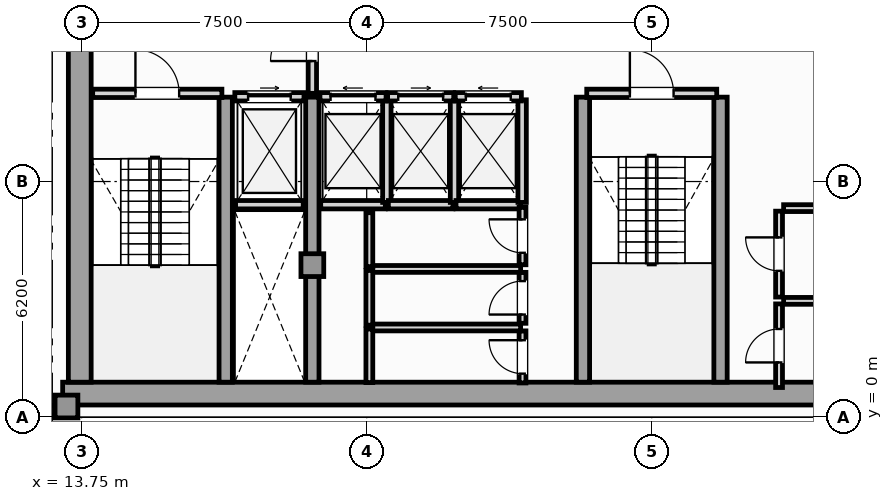
"""IFC4 building model, lengths in metres.
Left out: names, types, materials, properties, quantities, classifications, styles, units other than length and angle.
Written with IfcOpenShell. Run it as: python <this file> out.ifc"""

import sys

from ifc_helpers import new_model, si_unit, direction, frame, frame_2d, origin, origin_2d, place, context, subcontext, project, spatial, rectangle, extrude, element, fill, save


model = new_model("IFC4")
c1 = context("Model", 3, precision=1e-05, world=origin(), true_north=direction((0.0, 1.0)))
c2 = subcontext(c1, "Body", "Model", "MODEL_VIEW")
j1 = project(units=[si_unit("LENGTHUNIT", "METRE"), si_unit("PLANEANGLEUNIT", "RADIAN")], contexts=[c1])
p1 = place(None, origin())
s1 = spatial("IfcSite", under=j1, at=p1, CompositionType="ELEMENT")
p2 = place(p1, origin())
s2 = spatial("IfcBuilding", under=s1, at=p2, CompositionType="ELEMENT")
p3 = place(p2, frame((0.0, 0.0, 284.9)))
s3 = spatial("IfcBuildingStorey", under=s2, at=p3, CompositionType="ELEMENT", Elevation=284.9)
p4 = place(p3, frame((13.25, 0.62, 0.0), z_axis=(0.0, 0.0, 1.0), x_axis=(1.0, 0.0, 0.0)))
e1 = element("IfcWall", 1, at=p4, inside=s3, PredefinedType="SHEAR", context=c2, shape_type="SweptSolid", body=[
    extrude(rectangle(XDim=31.0, YDim=0.6, at=frame_2d((15.5, 0.0))), origin(), (0.0, 0.0, 1.0), 3.65),
])
p5 = place(p3, frame((13.7, 0.92, 0.0), z_axis=(0.0, 0.0, 1.0), x_axis=(0.0, 1.0, 0.0)))
e2 = element("IfcWall", 2, at=p5, inside=s3, PredefinedType="SHEAR", context=c2, shape_type="SweptSolid", body=[
    extrude(rectangle(XDim=10.53, YDim=0.6, at=frame_2d((5.265, 0.0))), origin(), (0.0, 0.0, 1.0), 3.65),
])
for number, where, z_axis, x_axis in (
    (3, (17.54, 0.92, 0.0), (0.0, 0.0, 1.0), (0.0, 1.0, 0.0)),
    (4, (19.82, 0.92, 0.0), (0.0, 0.0, 1.0), (0.0, 1.0, 0.0)),
    (5, (26.94, 0.92, 0.0), (0.0, 0.0, 1.0), (0.0, 1.0, 0.0)),
    (6, (30.56, 0.92, 0.0), (0.0, 0.0, 1.0), (0.0, 1.0, 0.0)),
):
    element("IfcWall", number, at=place(p3, frame(where, z_axis=z_axis, x_axis=x_axis)), inside=s3, PredefinedType="SHEAR", context=c2, shape_type="SweptSolid", body=[
        extrude(rectangle(XDim=7.5, YDim=0.35, at=frame_2d((3.75, 0.0))), origin(), (0.0, 0.0, 1.0), 3.65),
    ])
for number, where, z_axis, x_axis in (
    (7, (13.35, 0.28, 0.0), (0.0, 0.0, 1.0), (1.0, 0.0, 0.0)),
    (8, (19.82, 4.0, 0.0), (0.0, 0.0, 1.0), (1.0, 0.0, 0.0)),
):
    element("IfcColumn", number, at=place(p3, frame(where, z_axis=z_axis, x_axis=x_axis)), inside=s3, PredefinedType="COLUMN", context=c2, shape_type="SweptSolid", body=[
        extrude(rectangle(XDim=0.6, YDim=0.6, at=origin_2d()), origin(), (0.0, 0.0, 1.0), 3.85),
    ])
p6 = place(p3, frame((11.664, 0.18, 0.0), z_axis=(0.0, 0.0, 1.0), x_axis=(1.0, 0.0, 0.0)))
e9 = element("IfcWall", 9, at=p6, inside=s3, PredefinedType="SOLIDWALL", context=c2, shape_type="SweptSolid", body=[
    extrude(rectangle(XDim=1.586, YDim=0.26, at=frame_2d((0.793, 0.0))), origin(), (0.0, 0.0, 1.0), 3.65),
])
p7 = place(p3, frame((17.8, 5.59, 0.0), z_axis=(0.0, 0.0, 1.0), x_axis=(1.0, 0.0, 0.0)))
e10 = element("IfcWall", 10, at=p7, inside=s3, PredefinedType="SOLIDWALL", context=c2, shape_type="SweptSolid", body=[
    extrude(rectangle(XDim=1.78, YDim=0.22, at=frame_2d((0.89, 0.0))), origin(), (0.0, 0.0, 1.0), 3.65),
])
p8 = place(p3, frame((17.78, 8.43, 0.0), z_axis=(0.0, 0.0, 1.0), x_axis=(1.0, 0.0, 0.0)))
e11 = element("IfcWall", 11, at=p8, inside=s3, PredefinedType="SOLIDWALL", context=c2, shape_type="SweptSolid", body=[
    extrude(rectangle(XDim=1.82, YDim=0.22, at=frame_2d((0.91, 0.0))), origin(), (0.0, 0.0, 1.0), 3.65),
])
p9 = place(p8, frame((0.35, 0.0, 0.0)))
e12 = element("IfcOpeningElement", 12, at=p9, cuts=e11, PredefinedType="OPENING", context=c2, shape_type="SweptSolid", body=[
    extrude(rectangle(XDim=1.12, YDim=2.25, at=frame_2d((0.56, 1.125))), frame((0.0, 0.12, 0.0), z_axis=(0.0, -1.0, 0.0), x_axis=(1.0, 0.0, 0.0)), (0.0, 0.0, 1.0), 0.24),
])
p10 = place(p3, frame((20.04, 5.59, 0.0), z_axis=(0.0, 0.0, 1.0), x_axis=(1.0, 0.0, 0.0)))
e13 = element("IfcWall", 13, at=p10, inside=s3, PredefinedType="SOLIDWALL", context=c2, shape_type="SweptSolid", body=[
    extrude(rectangle(XDim=1.7, YDim=0.22, at=frame_2d((0.85, 0.0))), origin(), (0.0, 0.0, 1.0), 3.65),
])
p11 = place(p3, frame((21.78, 5.65, 0.0), z_axis=(0.0, 0.0, 1.0), x_axis=(0.0, 1.0, 0.0)))
e14 = element("IfcWall", 14, at=p11, inside=s3, PredefinedType="SOLIDWALL", context=c2, shape_type="SweptSolid", body=[
    extrude(rectangle(XDim=2.7, YDim=0.22, at=frame_2d((1.35, 0.0))), origin(), (0.0, 0.0, 1.0), 3.65),
])
p12 = place(p3, frame((20.02, 8.43, 0.0), z_axis=(0.0, 0.0, 1.0), x_axis=(1.0, 0.0, 0.0)))
e15 = element("IfcWall", 15, at=p12, inside=s3, PredefinedType="SOLIDWALL", context=c2, shape_type="SweptSolid", body=[
    extrude(rectangle(XDim=1.74, YDim=0.22, at=frame_2d((0.87, 0.0))), origin(), (0.0, 0.0, 1.0), 3.65),
])
p13 = place(p12, frame((0.28, 0.0, 0.0)))
e16 = element("IfcOpeningElement", 16, at=p13, cuts=e15, PredefinedType="OPENING", context=c2, shape_type="SweptSolid", body=[
    extrude(rectangle(XDim=1.18, YDim=2.2, at=frame_2d((0.59, 1.1))), frame((0.0, 0.12, 0.0), z_axis=(0.0, -1.0, 0.0), x_axis=(1.0, 0.0, 0.0)), (0.0, 0.0, 1.0), 0.24),
])
p14 = place(p3, frame((21.82, 5.59, 0.0), z_axis=(0.0, 0.0, 1.0), x_axis=(1.0, 0.0, 0.0)))
e17 = element("IfcWall", 17, at=p14, inside=s3, PredefinedType="SOLIDWALL", context=c2, shape_type="SweptSolid", body=[
    extrude(rectangle(XDim=1.7, YDim=0.22, at=frame_2d((0.85, 0.0))), origin(), (0.0, 0.0, 1.0), 3.65),
])
p15 = place(p3, frame((23.56, 5.65, 0.0), z_axis=(0.0, 0.0, 1.0), x_axis=(0.0, 1.0, 0.0)))
e18 = element("IfcWall", 18, at=p15, inside=s3, PredefinedType="SOLIDWALL", context=c2, shape_type="SweptSolid", body=[
    extrude(rectangle(XDim=2.7, YDim=0.22, at=frame_2d((1.35, 0.0))), origin(), (0.0, 0.0, 1.0), 3.65),
])
p16 = place(p3, frame((21.8, 8.43, 0.0), z_axis=(0.0, 0.0, 1.0), x_axis=(1.0, 0.0, 0.0)))
e19 = element("IfcWall", 19, at=p16, inside=s3, PredefinedType="SOLIDWALL", context=c2, shape_type="SweptSolid", body=[
    extrude(rectangle(XDim=1.74, YDim=0.22, at=frame_2d((0.87, 0.0))), origin(), (0.0, 0.0, 1.0), 3.65),
])
p17 = place(p16, frame((0.28, 0.0, 0.0)))
e20 = element("IfcOpeningElement", 20, at=p17, cuts=e19, PredefinedType="OPENING", context=c2, shape_type="SweptSolid", body=[
    extrude(rectangle(XDim=1.18, YDim=2.2, at=frame_2d((0.59, 1.1))), frame((0.0, 0.12, 0.0), z_axis=(0.0, -1.0, 0.0), x_axis=(1.0, 0.0, 0.0)), (0.0, 0.0, 1.0), 0.24),
])
p18 = place(p3, frame((23.6, 5.59, 0.0), z_axis=(0.0, 0.0, 1.0), x_axis=(1.0, 0.0, 0.0)))
e21 = element("IfcWall", 21, at=p18, inside=s3, PredefinedType="SOLIDWALL", context=c2, shape_type="SweptSolid", body=[
    extrude(rectangle(XDim=1.7, YDim=0.22, at=frame_2d((0.85, 0.0))), origin(), (0.0, 0.0, 1.0), 3.65),
])
p19 = place(p3, frame((25.34, 5.65, 0.0), z_axis=(0.0, 0.0, 1.0), x_axis=(0.0, 1.0, 0.0)))
e22 = element("IfcWall", 22, at=p19, inside=s3, PredefinedType="SOLIDWALL", context=c2, shape_type="SweptSolid", body=[
    extrude(rectangle(XDim=2.7, YDim=0.22, at=frame_2d((1.35, 0.0))), origin(), (0.0, 0.0, 1.0), 3.65),
])
p20 = place(p3, frame((23.58, 8.43, 0.0), z_axis=(0.0, 0.0, 1.0), x_axis=(1.0, 0.0, 0.0)))
e23 = element("IfcWall", 23, at=p20, inside=s3, PredefinedType="SOLIDWALL", context=c2, shape_type="SweptSolid", body=[
    extrude(rectangle(XDim=1.74, YDim=0.22, at=frame_2d((0.87, 0.0))), origin(), (0.0, 0.0, 1.0), 3.65),
])
p21 = place(p20, frame((0.28, 0.0, 0.0)))
e24 = element("IfcOpeningElement", 24, at=p21, cuts=e23, PredefinedType="OPENING", context=c2, shape_type="SweptSolid", body=[
    extrude(rectangle(XDim=1.18, YDim=2.2, at=frame_2d((0.59, 1.1))), frame((0.0, 0.12, 0.0), z_axis=(0.0, -1.0, 0.0), x_axis=(1.0, 0.0, 0.0)), (0.0, 0.0, 1.0), 0.24),
])
p22 = place(p3, frame((14.04, 8.52, 0.0), z_axis=(0.0, 0.0, 1.0), x_axis=(1.0, 0.0, 0.0)))
e25 = element("IfcWall", 25, at=p22, inside=s3, PredefinedType="SOLIDWALL", context=c2, shape_type="SweptSolid", body=[
    extrude(rectangle(XDim=3.4, YDim=0.22, at=frame_2d((1.7, 0.0))), origin(), (0.0, 0.0, 1.0), 3.65),
])
p23 = place(p22, frame((1.125, 0.0, 0.0)))
e26 = element("IfcOpeningElement", 26, at=p23, cuts=e25, PredefinedType="OPENING", context=c2, shape_type="SweptSolid", body=[
    extrude(rectangle(XDim=1.15, YDim=2.2, at=frame_2d((0.575, 1.1))), frame((0.0, 0.12, 0.0), z_axis=(0.0, -1.0, 0.0), x_axis=(1.0, 0.0, 0.0)), (0.0, 0.0, 1.0), 0.24),
])
p24 = place(p3, frame((27.04, 8.52, 0.0), z_axis=(0.0, 0.0, 1.0), x_axis=(1.0, 0.0, 0.0)))
e27 = element("IfcWall", 27, at=p24, inside=s3, PredefinedType="SOLIDWALL", context=c2, shape_type="SweptSolid", body=[
    extrude(rectangle(XDim=3.42, YDim=0.22, at=frame_2d((1.71, 0.0))), origin(), (0.0, 0.0, 1.0), 3.65),
])
p25 = place(p24, frame((1.135, 0.0, 0.0)))
e28 = element("IfcOpeningElement", 28, at=p25, cuts=e27, PredefinedType="OPENING", context=c2, shape_type="SweptSolid", body=[
    extrude(rectangle(XDim=1.15, YDim=2.2, at=frame_2d((0.575, 1.1))), frame((0.0, 0.12, 0.0), z_axis=(0.0, -1.0, 0.0), x_axis=(1.0, 0.0, 0.0)), (0.0, 0.0, 1.0), 0.24),
])
p26 = place(p3, frame((19.82, 8.52, 0.0), z_axis=(0.0, 0.0, 1.0), x_axis=(0.0, 1.0, 0.0)))
e29 = element("IfcWall", 29, at=p26, inside=s3, PredefinedType="SOLIDWALL", context=c2, shape_type="SweptSolid", body=[
    extrude(rectangle(XDim=2.8, YDim=0.22, at=frame_2d((1.4, 0.0))), origin(), (0.0, 0.0, 1.0), 3.106),
])
p27 = place(p26, frame((0.85, 0.0, 0.0)))
e30 = element("IfcOpeningElement", 30, at=p27, cuts=e29, PredefinedType="OPENING", context=c2, shape_type="SweptSolid", body=[
    extrude(rectangle(XDim=1.1, YDim=2.2, at=frame_2d((0.55, 1.1))), frame((0.0, 0.12, 0.0), z_axis=(0.0, -1.0, 0.0), x_axis=(1.0, 0.0, 0.0)), (0.0, 0.0, 1.0), 0.24),
])
p28 = place(p3, frame((25.35, 0.9, 0.0), z_axis=(0.0, 0.0, 1.0), x_axis=(0.0, 1.0, 0.0)))
e31 = element("IfcWall", 31, at=p28, inside=s3, PredefinedType="PARTITIONING", context=c2, shape_type="SweptSolid", body=[
    extrude(rectangle(XDim=1.37, YDim=0.18, at=frame_2d((0.685, 0.0))), origin(), (0.0, 0.0, 1.0), 3.65),
])
p29 = place(p28, frame((0.245, 0.0, 0.0)))
e32 = element("IfcOpeningElement", 32, at=p29, cuts=e31, PredefinedType="OPENING", context=c2, shape_type="SweptSolid", body=[
    extrude(rectangle(XDim=0.88, YDim=2.05, at=frame_2d((0.44, 1.025))), frame((0.0, 0.1, 0.0), z_axis=(0.0, -1.0, 0.0), x_axis=(1.0, 0.0, 0.0)), (0.0, 0.0, 1.0), 0.2),
])
p30 = place(p3, frame((21.36, 2.36, 0.0), z_axis=(0.0, 0.0, 1.0), x_axis=(1.0, 0.0, 0.0)))
e33 = element("IfcWall", 33, at=p30, inside=s3, PredefinedType="PARTITIONING", context=c2, shape_type="SweptSolid", body=[
    extrude(rectangle(XDim=3.94, YDim=0.18, at=frame_2d((1.97, 0.0))), origin(), (0.0, 0.0, 1.0), 3.65),
])
p31 = place(p3, frame((21.32, 0.91, 0.0), z_axis=(0.0, 0.0, 1.0), x_axis=(0.0, 1.0, 0.0)))
e34 = element("IfcWall", 34, at=p31, inside=s3, PredefinedType="PARTITIONING", context=c2, shape_type="SweptSolid", body=[
    extrude(rectangle(XDim=1.41, YDim=0.18, at=frame_2d((0.705, 0.0))), origin(), (0.0, 0.0, 1.0), 3.65),
])
p32 = place(p3, frame((25.35, 2.47, 0.0), z_axis=(0.0, 0.0, 1.0), x_axis=(0.0, 1.0, 0.0)))
e35 = element("IfcWall", 35, at=p32, inside=s3, PredefinedType="PARTITIONING", context=c2, shape_type="SweptSolid", body=[
    extrude(rectangle(XDim=1.34, YDim=0.18, at=frame_2d((0.67, 0.0))), origin(), (0.0, 0.0, 1.0), 3.65),
])
p33 = place(p32, frame((0.23, 0.0, 0.0)))
e36 = element("IfcOpeningElement", 36, at=p33, cuts=e35, PredefinedType="OPENING", context=c2, shape_type="SweptSolid", body=[
    extrude(rectangle(XDim=0.88, YDim=2.05, at=frame_2d((0.44, 1.025))), frame((0.0, 0.1, 0.0), z_axis=(0.0, -1.0, 0.0), x_axis=(1.0, 0.0, 0.0)), (0.0, 0.0, 1.0), 0.2),
])
p34 = place(p3, frame((21.36, 3.9, 0.0), z_axis=(0.0, 0.0, 1.0), x_axis=(1.0, 0.0, 0.0)))
e37 = element("IfcWall", 37, at=p34, inside=s3, PredefinedType="PARTITIONING", context=c2, shape_type="SweptSolid", body=[
    extrude(rectangle(XDim=3.94, YDim=0.18, at=frame_2d((1.97, 0.0))), origin(), (0.0, 0.0, 1.0), 3.65),
])
p35 = place(p3, frame((21.32, 2.42, 0.0), z_axis=(0.0, 0.0, 1.0), x_axis=(0.0, 1.0, 0.0)))
e38 = element("IfcWall", 38, at=p35, inside=s3, PredefinedType="PARTITIONING", context=c2, shape_type="SweptSolid", body=[
    extrude(rectangle(XDim=1.44, YDim=0.18, at=frame_2d((0.72, 0.0))), origin(), (0.0, 0.0, 1.0), 3.65),
])
p36 = place(p3, frame((25.35, 4.01, 0.0), z_axis=(0.0, 0.0, 1.0), x_axis=(0.0, 1.0, 0.0)))
e39 = element("IfcWall", 39, at=p36, inside=s3, PredefinedType="PARTITIONING", context=c2, shape_type="SweptSolid", body=[
    extrude(rectangle(XDim=1.51, YDim=0.18, at=frame_2d((0.755, 0.0))), origin(), (0.0, 0.0, 1.0), 3.65),
])
p37 = place(p36, frame((0.315, 0.0, 0.0)))
e40 = element("IfcOpeningElement", 40, at=p37, cuts=e39, PredefinedType="OPENING", context=c2, shape_type="SweptSolid", body=[
    extrude(rectangle(XDim=0.88, YDim=2.05, at=frame_2d((0.44, 1.025))), frame((0.0, 0.1, 0.0), z_axis=(0.0, -1.0, 0.0), x_axis=(1.0, 0.0, 0.0)), (0.0, 0.0, 1.0), 0.2),
])
p38 = place(p3, frame((21.32, 3.96, 0.0), z_axis=(0.0, 0.0, 1.0), x_axis=(0.0, 1.0, 0.0)))
e41 = element("IfcWall", 41, at=p38, inside=s3, PredefinedType="PARTITIONING", context=c2, shape_type="SweptSolid", body=[
    extrude(rectangle(XDim=1.42, YDim=0.18, at=frame_2d((0.71, 0.0))), origin(), (0.0, 0.0, 1.0), 3.65),
])
p39 = place(p3, frame((32.1, 0.78, 0.0), z_axis=(0.0, 0.0, 1.0), x_axis=(0.0, 1.0, 0.0)))
e42 = element("IfcWall", 42, at=p39, inside=s3, PredefinedType="PARTITIONING", context=c2, shape_type="SweptSolid", body=[
    extrude(rectangle(XDim=2.2, YDim=0.18, at=frame_2d((1.1, 0.0))), origin(), (0.0, 0.0, 1.0), 3.65),
])
p40 = place(p39, frame((0.66, 0.0, 0.0)))
e43 = element("IfcOpeningElement", 43, at=p40, cuts=e42, PredefinedType="OPENING", context=c2, shape_type="SweptSolid", body=[
    extrude(rectangle(XDim=0.88, YDim=2.05, at=frame_2d((0.44, 1.025))), frame((0.0, 0.1, 0.0), z_axis=(0.0, -1.0, 0.0), x_axis=(1.0, 0.0, 0.0)), (0.0, 0.0, 1.0), 0.2),
])
p41 = place(p3, frame((32.22, 3.06, 0.0), z_axis=(0.0, 0.0, 1.0), x_axis=(1.0, 0.0, 0.0)))
e44 = element("IfcWall", 44, at=p41, inside=s3, PredefinedType="PARTITIONING", context=c2, shape_type="SweptSolid", body=[
    extrude(rectangle(XDim=5.18, YDim=0.18, at=frame_2d((2.59, 0.0))), origin(), (0.0, 0.0, 1.0), 3.65),
])
p42 = place(p3, frame((32.1, 3.16, 0.0), z_axis=(0.0, 0.0, 1.0), x_axis=(0.0, 1.0, 0.0)))
e45 = element("IfcWall", 45, at=p42, inside=s3, PredefinedType="PARTITIONING", context=c2, shape_type="SweptSolid", body=[
    extrude(rectangle(XDim=2.26, YDim=0.18, at=frame_2d((1.13, 0.0))), origin(), (0.0, 0.0, 1.0), 3.65),
])
p43 = place(p42, frame((0.69, 0.0, 0.0)))
e46 = element("IfcOpeningElement", 46, at=p43, cuts=e45, PredefinedType="OPENING", context=c2, shape_type="SweptSolid", body=[
    extrude(rectangle(XDim=0.88, YDim=2.05, at=frame_2d((0.44, 1.025))), frame((0.0, 0.1, 0.0), z_axis=(0.0, -1.0, 0.0), x_axis=(1.0, 0.0, 0.0)), (0.0, 0.0, 1.0), 0.2),
])
p44 = place(p3, frame((32.22, 5.5, 0.0), z_axis=(0.0, 0.0, 1.0), x_axis=(1.0, 0.0, 0.0)))
e47 = element("IfcWall", 47, at=p44, inside=s3, PredefinedType="PARTITIONING", context=c2, shape_type="SweptSolid", body=[
    extrude(rectangle(XDim=2.9, YDim=0.18, at=frame_2d((1.45, 0.0))), origin(), (0.0, 0.0, 1.0), 3.65),
])
p45 = place(p9, origin())
e48 = element("IfcDoor", 48, at=p45, inside=s3, OperationType="SLIDING_TO_RIGHT", PredefinedType="DOOR", context=c2, shape_type="SweptSolid", body=[
    extrude(rectangle(XDim=1.12, YDim=2.25, at=frame_2d((0.56, 1.125))), frame((0.0, 0.025, 0.0), z_axis=(0.0, -1.0, 0.0), x_axis=(1.0, 0.0, 0.0)), (0.0, 0.0, 1.0), 0.05),
])
fill(e12, e48)
p46 = place(p13, origin())
e49 = element("IfcDoor", 49, at=p46, inside=s3, OperationType="SLIDING_TO_LEFT", PredefinedType="DOOR", context=c2, shape_type="SweptSolid", body=[
    extrude(rectangle(XDim=1.18, YDim=2.2, at=frame_2d((0.59, 1.1))), frame((0.0, 0.025, 0.0), z_axis=(0.0, -1.0, 0.0), x_axis=(1.0, 0.0, 0.0)), (0.0, 0.0, 1.0), 0.05),
])
fill(e16, e49)
p47 = place(p17, origin())
e50 = element("IfcDoor", 50, at=p47, inside=s3, OperationType="SLIDING_TO_RIGHT", PredefinedType="DOOR", context=c2, shape_type="SweptSolid", body=[
    extrude(rectangle(XDim=1.18, YDim=2.2, at=frame_2d((0.59, 1.1))), frame((0.0, 0.025, 0.0), z_axis=(0.0, -1.0, 0.0), x_axis=(1.0, 0.0, 0.0)), (0.0, 0.0, 1.0), 0.05),
])
fill(e20, e50)
p48 = place(p21, origin())
e51 = element("IfcDoor", 51, at=p48, inside=s3, OperationType="SLIDING_TO_LEFT", PredefinedType="DOOR", context=c2, shape_type="SweptSolid", body=[
    extrude(rectangle(XDim=1.18, YDim=2.2, at=frame_2d((0.59, 1.1))), frame((0.0, 0.025, 0.0), z_axis=(0.0, -1.0, 0.0), x_axis=(1.0, 0.0, 0.0)), (0.0, 0.0, 1.0), 0.05),
])
fill(e24, e51)
p49 = place(p23, origin())
e52 = element("IfcDoor", 52, at=p49, inside=s3, OperationType="SINGLE_SWING_LEFT", PredefinedType="DOOR", context=c2, shape_type="SweptSolid", body=[
    extrude(rectangle(XDim=1.15, YDim=2.2, at=frame_2d((0.575, 1.1))), frame((0.0, 0.025, 0.0), z_axis=(0.0, -1.0, 0.0), x_axis=(1.0, 0.0, 0.0)), (0.0, 0.0, 1.0), 0.05),
])
fill(e26, e52)
p50 = place(p25, origin())
e53 = element("IfcDoor", 53, at=p50, inside=s3, OperationType="SINGLE_SWING_LEFT", PredefinedType="DOOR", context=c2, shape_type="SweptSolid", body=[
    extrude(rectangle(XDim=1.15, YDim=2.2, at=frame_2d((0.575, 1.1))), frame((0.0, 0.025, 0.0), z_axis=(0.0, -1.0, 0.0), x_axis=(1.0, 0.0, 0.0)), (0.0, 0.0, 1.0), 0.05),
])
fill(e28, e53)
p51 = place(p27, origin())
e54 = element("IfcDoor", 54, at=p51, inside=s3, OperationType="SINGLE_SWING_LEFT", PredefinedType="DOOR", context=c2, shape_type="SweptSolid", body=[
    extrude(rectangle(XDim=1.1, YDim=2.2, at=frame_2d((0.55, 1.1))), frame((0.0, 0.025, 0.0), z_axis=(0.0, -1.0, 0.0), x_axis=(1.0, 0.0, 0.0)), (0.0, 0.0, 1.0), 0.05),
])
fill(e30, e54)
p52 = place(p29, origin())
e55 = element("IfcDoor", 55, at=p52, inside=s3, OperationType="SINGLE_SWING_RIGHT", PredefinedType="DOOR", context=c2, shape_type="SweptSolid", body=[
    extrude(rectangle(XDim=0.88, YDim=2.05, at=frame_2d((0.44, 1.025))), frame((0.0, 0.025, 0.0), z_axis=(0.0, -1.0, 0.0), x_axis=(1.0, 0.0, 0.0)), (0.0, 0.0, 1.0), 0.05),
])
fill(e32, e55)
p53 = place(p33, origin())
e56 = element("IfcDoor", 56, at=p53, inside=s3, OperationType="SINGLE_SWING_LEFT", PredefinedType="DOOR", context=c2, shape_type="SweptSolid", body=[
    extrude(rectangle(XDim=0.88, YDim=2.05, at=frame_2d((0.44, 1.025))), frame((0.0, 0.025, 0.0), z_axis=(0.0, -1.0, 0.0), x_axis=(1.0, 0.0, 0.0)), (0.0, 0.0, 1.0), 0.05),
])
fill(e36, e56)
p54 = place(p37, origin())
e57 = element("IfcDoor", 57, at=p54, inside=s3, OperationType="SINGLE_SWING_RIGHT", PredefinedType="DOOR", context=c2, shape_type="SweptSolid", body=[
    extrude(rectangle(XDim=0.88, YDim=2.05, at=frame_2d((0.44, 1.025))), frame((0.0, 0.025, 0.0), z_axis=(0.0, -1.0, 0.0), x_axis=(1.0, 0.0, 0.0)), (0.0, 0.0, 1.0), 0.05),
])
fill(e40, e57)
p55 = place(p40, origin())
e58 = element("IfcDoor", 58, at=p55, inside=s3, OperationType="SINGLE_SWING_LEFT", PredefinedType="DOOR", context=c2, shape_type="SweptSolid", body=[
    extrude(rectangle(XDim=0.88, YDim=2.05, at=frame_2d((0.44, 1.025))), frame((0.0, 0.025, 0.0), z_axis=(0.0, -1.0, 0.0), x_axis=(1.0, 0.0, 0.0)), (0.0, 0.0, 1.0), 0.05),
])
fill(e43, e58)
p56 = place(p43, origin())
e59 = element("IfcDoor", 59, at=p56, inside=s3, OperationType="SINGLE_SWING_RIGHT", PredefinedType="DOOR", context=c2, shape_type="SweptSolid", body=[
    extrude(rectangle(XDim=0.88, YDim=2.05, at=frame_2d((0.44, 1.025))), frame((0.0, 0.025, 0.0), z_axis=(0.0, -1.0, 0.0), x_axis=(1.0, 0.0, 0.0)), (0.0, 0.0, 1.0), 0.05),
])
fill(e46, e59)
save(model, sys.argv[1])
